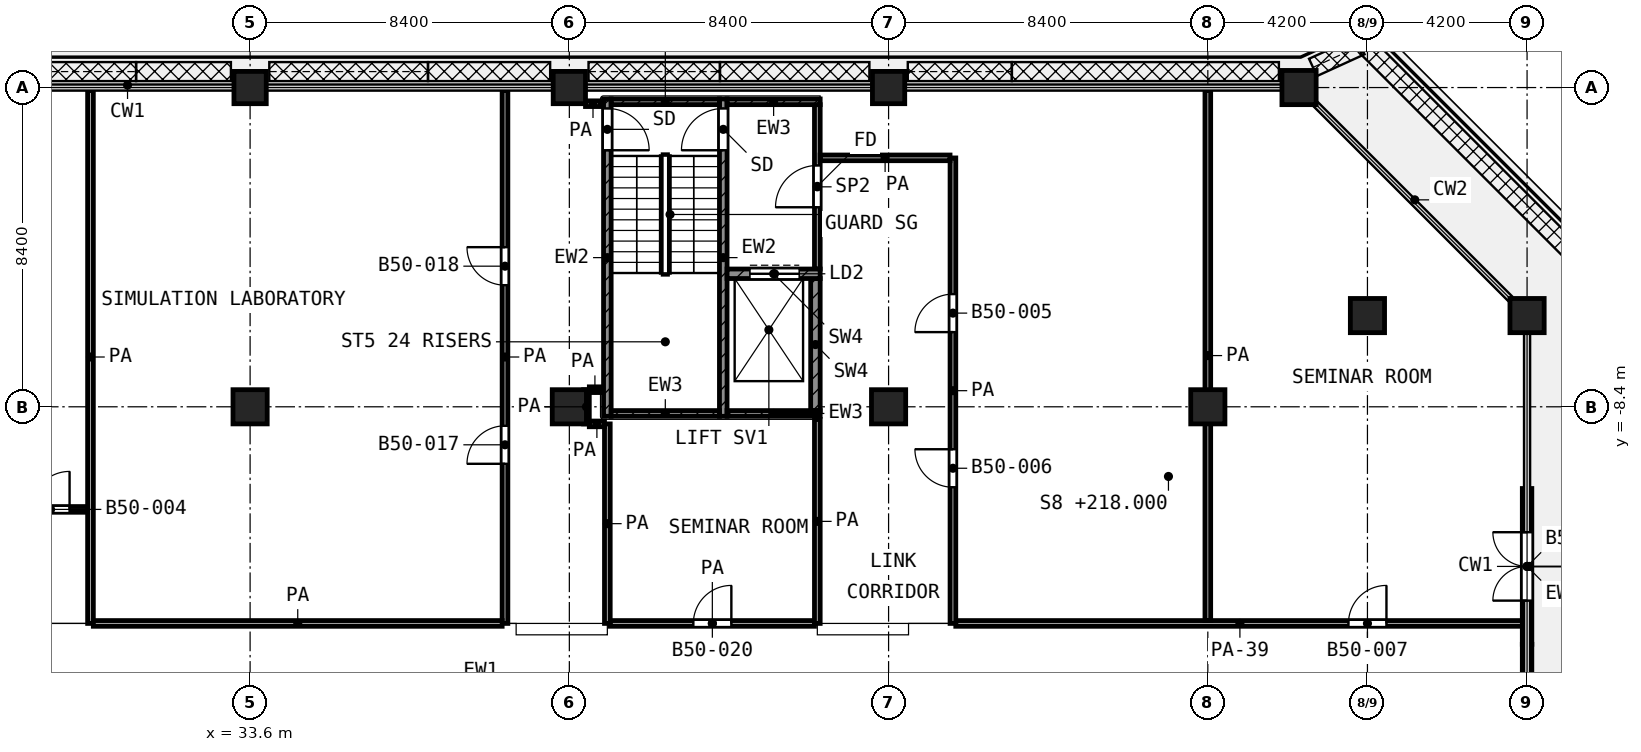
"""IFC4 building model, lengths in metres.
Left out: names, types, materials, properties, quantities, classifications, styles, units other than length and angle.
Written with IfcOpenShell. Run it as: python <this file> out.ifc"""

import sys

from ifc_helpers import new_model, si_unit, direction, frame, frame_2d, origin, origin_2d, place, context, subcontext, project, spatial, rectangle, extrude, element, fill, save


model = new_model("IFC4")
c1 = context("Model", 3, precision=1e-05, world=origin(), true_north=direction((0.0, 1.0)))
c2 = subcontext(c1, "Body", "Model", "MODEL_VIEW")
j1 = project(units=[si_unit("LENGTHUNIT", "METRE"), si_unit("PLANEANGLEUNIT", "RADIAN")], contexts=[c1])
p1 = place(None, origin())
s1 = spatial("IfcSite", under=j1, at=p1, CompositionType="ELEMENT")
p2 = place(p1, origin())
s2 = spatial("IfcBuilding", under=s1, at=p2, CompositionType="ELEMENT")
p3 = place(p2, frame((0.0, 0.0, 218.0)))
s3 = spatial("IfcBuildingStorey", under=s2, at=p3, CompositionType="ELEMENT", Elevation=218.0)
for number, where, z_axis, x_axis in (
    (1, (33.6, 0.0, 0.0), (0.0, 0.0, 1.0), (1.0, 0.0, 0.0)),
    (2, (42.0, 0.0, 0.0), (0.0, 0.0, 1.0), (1.0, 0.0, 0.0)),
    (3, (50.4, 0.0, 0.0), (0.0, 0.0, 1.0), (1.0, 0.0, 0.0)),
):
    element("IfcColumn", number, at=place(p3, frame(where, z_axis=z_axis, x_axis=x_axis)), inside=s3, PredefinedType="COLUMN", context=c2, shape_type="SweptSolid", body=[
        extrude(rectangle(XDim=0.85, YDim=0.85, at=origin_2d()), origin(), (0.0, 0.0, 1.0), 4.2),
    ])
for number, where, z_axis, x_axis in (
    (4, (61.2, 0.0, 0.0), (0.0, 0.0, 1.0), (1.0, 0.0, 0.0)),
    (5, (63.0, -6.0, 0.0), (0.0, 0.0, 1.0), (1.0, 0.0, 0.0)),
    (6, (67.2, -6.0, 0.0), (0.0, 0.0, 1.0), (1.0, 0.0, 0.0)),
    (7, (33.6, -8.4, 0.0), (0.0, 0.0, 1.0), (1.0, 0.0, 0.0)),
    (8, (42.0, -8.4, 0.0), (0.0, 0.0, 1.0), (1.0, 0.0, 0.0)),
    (9, (50.4, -8.4, 0.0), (0.0, 0.0, 1.0), (1.0, 0.0, 0.0)),
    (10, (58.8, -8.4, 0.0), (0.0, 0.0, 1.0), (1.0, 0.0, 0.0)),
):
    element("IfcColumn", number, at=place(p3, frame(where, z_axis=z_axis, x_axis=x_axis)), inside=s3, PredefinedType="COLUMN", context=c2, shape_type="SweptSolid", body=[
        extrude(rectangle(XDim=0.9, YDim=0.9, at=origin_2d()), origin(), (0.0, 0.0, 1.0), 4.2),
    ])
p4 = place(p3, frame((67.2, -18.75, 0.0), z_axis=(0.0, 0.0, 1.0), x_axis=(0.0, 1.0, 0.0)))
e11 = element("IfcWall", 11, at=p4, inside=s3, PredefinedType="SOLIDWALL", context=c2, shape_type="SweptSolid", body=[
    extrude(rectangle(XDim=4.1, YDim=0.25, at=frame_2d((2.05, 0.0))), origin(), (0.0, 0.0, 1.0), 2.58),
])
p5 = place(p4, frame((2.25, 0.0, 0.0)))
e12 = element("IfcOpeningElement", 12, at=p5, cuts=e11, PredefinedType="OPENING", context=c2, shape_type="SweptSolid", body=[
    extrude(rectangle(XDim=1.0, YDim=2.1, at=frame_2d((0.5, 1.05))), frame((0.0, 0.135, 0.0), z_axis=(0.0, -1.0, 0.0), x_axis=(1.0, 0.0, 0.0)), (0.0, 0.0, 1.0), 0.27),
])
p6 = place(p3, frame((67.2, -14.65, 0.0), z_axis=(0.0, 0.0, 1.0), x_axis=(0.0, 1.0, 0.0)))
e13 = element("IfcWall", 13, at=p6, inside=s3, PredefinedType="SOLIDWALL", context=c2, shape_type="SweptSolid", body=[
    extrude(rectangle(XDim=4.1, YDim=0.25, at=frame_2d((2.05, 0.0))), origin(), (0.0, 0.0, 1.0), 2.58),
])
p7 = place(p6, frame((1.15, 0.0, 0.0)))
e14 = element("IfcOpeningElement", 14, at=p7, cuts=e13, PredefinedType="OPENING", context=c2, shape_type="SweptSolid", body=[
    extrude(rectangle(XDim=1.8, YDim=2.1, at=frame_2d((0.9, 1.05))), frame((0.0, 0.135, 0.0), z_axis=(0.0, -1.0, 0.0), x_axis=(1.0, 0.0, 0.0)), (0.0, 0.0, 1.0), 0.27),
])
p8 = place(p3, frame((43.0, -8.65, 0.0), z_axis=(0.0, 0.0, 1.0), x_axis=(0.0, 1.0, 0.0)))
e15 = element("IfcWall", 15, at=p8, inside=s3, PredefinedType="SHEAR", context=c2, shape_type="SweptSolid", body=[
    extrude(rectangle(XDim=8.35, YDim=0.2, at=frame_2d((4.175, 0.0))), origin(), (0.0, 0.0, 1.0), 3.6),
])
p9 = place(p8, frame((7.0, 0.0, 0.0)))
e16 = element("IfcOpeningElement", 16, at=p9, cuts=e15, PredefinedType="OPENING", context=c2, shape_type="SweptSolid", body=[
    extrude(rectangle(XDim=1.1, YDim=2.1, at=frame_2d((0.55, 1.05))), frame((0.0, 0.11, 0.0), z_axis=(0.0, -1.0, 0.0), x_axis=(1.0, 0.0, 0.0)), (0.0, 0.0, 1.0), 0.22),
])
p10 = place(p3, frame((46.05, -8.65, 0.0), z_axis=(0.0, 0.0, 1.0), x_axis=(0.0, 1.0, 0.0)))
e17 = element("IfcWall", 17, at=p10, inside=s3, PredefinedType="SHEAR", context=c2, shape_type="SweptSolid", body=[
    extrude(rectangle(XDim=8.35, YDim=0.2, at=frame_2d((4.175, 0.0))), origin(), (0.0, 0.0, 1.0), 3.6),
])
p11 = place(p10, frame((7.0, 0.0, 0.0)))
e18 = element("IfcOpeningElement", 18, at=p11, cuts=e17, PredefinedType="OPENING", context=c2, shape_type="SweptSolid", body=[
    extrude(rectangle(XDim=1.1, YDim=2.1, at=frame_2d((0.55, 1.05))), frame((0.0, 0.11, 0.0), z_axis=(0.0, -1.0, 0.0), x_axis=(1.0, 0.0, 0.0)), (0.0, 0.0, 1.0), 0.22),
])
p12 = place(p3, frame((43.1, -0.375, 0.0), z_axis=(0.0, 0.0, 1.0), x_axis=(1.0, 0.0, 0.0)))
e19 = element("IfcWall", 19, at=p12, inside=s3, PredefinedType="SHEAR", context=c2, shape_type="SweptSolid", body=[
    extrude(rectangle(XDim=2.85, YDim=0.15, at=frame_2d((1.425, 0.0))), origin(), (0.0, 0.0, 1.0), 3.6),
])
p13 = place(p3, frame((46.15, -0.375, 0.0), z_axis=(0.0, 0.0, 1.0), x_axis=(1.0, 0.0, 0.0)))
e20 = element("IfcWall", 20, at=p13, inside=s3, PredefinedType="SHEAR", context=c2, shape_type="SweptSolid", body=[
    extrude(rectangle(XDim=2.45, YDim=0.15, at=frame_2d((1.225, 0.0))), origin(), (0.0, 0.0, 1.0), 3.6),
])
p14 = place(p3, frame((43.1, -8.575, 0.0), z_axis=(0.0, 0.0, 1.0), x_axis=(1.0, 0.0, 0.0)))
e21 = element("IfcWall", 21, at=p14, inside=s3, PredefinedType="SHEAR", context=c2, shape_type="SweptSolid", body=[
    extrude(rectangle(XDim=2.85, YDim=0.15, at=frame_2d((1.425, 0.0))), origin(), (0.0, 0.0, 1.0), 3.6),
])
p15 = place(p3, frame((46.15, -8.575, 0.0), z_axis=(0.0, 0.0, 1.0), x_axis=(1.0, 0.0, 0.0)))
e22 = element("IfcWall", 22, at=p15, inside=s3, PredefinedType="SHEAR", context=c2, shape_type="SweptSolid", body=[
    extrude(rectangle(XDim=2.45, YDim=0.15, at=frame_2d((1.225, 0.0))), origin(), (0.0, 0.0, 1.0), 3.6),
])
p16 = place(p3, frame((46.15, -4.9, 0.0), z_axis=(0.0, 0.0, 1.0), x_axis=(1.0, 0.0, 0.0)))
e23 = element("IfcWall", 23, at=p16, inside=s3, PredefinedType="SHEAR", context=c2, shape_type="SweptSolid", body=[
    extrude(rectangle(XDim=2.45, YDim=0.25, at=frame_2d((1.225, 0.0))), origin(), (0.0, 0.0, 1.0), 3.6),
])
p17 = place(p16, frame((0.6, 0.0, 0.0)))
e24 = element("IfcOpeningElement", 24, at=p17, cuts=e23, PredefinedType="OPENING", context=c2, shape_type="SweptSolid", body=[
    extrude(rectangle(XDim=1.3, YDim=2.1, at=frame_2d((0.65, 1.05))), frame((0.0, 0.135, 0.0), z_axis=(0.0, -1.0, 0.0), x_axis=(1.0, 0.0, 0.0)), (0.0, 0.0, 1.0), 0.27),
])
p18 = place(p3, frame((48.475, -8.5, 0.0), z_axis=(0.0, 0.0, 1.0), x_axis=(0.0, 1.0, 0.0)))
e25 = element("IfcWall", 25, at=p18, inside=s3, PredefinedType="SHEAR", context=c2, shape_type="SweptSolid", body=[
    extrude(rectangle(XDim=3.475, YDim=0.25, at=frame_2d((1.738, 0.0))), origin(), (0.0, 0.0, 1.0), 3.6),
])
p19 = place(p3, frame((48.525, -4.775, 0.0), z_axis=(0.0, 0.0, 1.0), x_axis=(0.0, 1.0, 0.0)))
e26 = element("IfcWall", 26, at=p19, inside=s3, PredefinedType="PARTITIONING", context=c2, shape_type="SweptSolid", body=[
    extrude(rectangle(XDim=4.325, YDim=0.15, at=frame_2d((2.163, 0.0))), origin(), (0.0, 0.0, 1.0), 3.6),
])
p20 = place(p19, frame((1.625, 0.0, 0.0)))
e27 = element("IfcOpeningElement", 27, at=p20, cuts=e26, PredefinedType="OPENING", context=c2, shape_type="SweptSolid", body=[
    extrude(rectangle(XDim=1.1, YDim=2.1, at=frame_2d((0.55, 1.05))), frame((0.0, 0.085, 0.0), z_axis=(0.0, -1.0, 0.0), x_axis=(1.0, 0.0, 0.0)), (0.0, 0.0, 1.0), 0.17),
])
p21 = place(p3, frame((29.475, -14.1, 0.0), z_axis=(0.0, 0.0, 1.0), x_axis=(1.0, 0.0, 0.0)))
e28 = element("IfcWall", 28, at=p21, inside=s3, PredefinedType="PARTITIONING", context=c2, shape_type="SweptSolid", body=[
    extrude(rectangle(XDim=10.757, YDim=0.15, at=frame_2d((5.378, 0.0))), origin(), (0.0, 0.0, 1.0), 3.6),
])
p22 = place(p3, frame((43.075, -14.1, 0.0), z_axis=(0.0, 0.0, 1.0), x_axis=(1.0, 0.0, 0.0)))
e29 = element("IfcWall", 29, at=p22, inside=s3, PredefinedType="PARTITIONING", context=c2, shape_type="SweptSolid", body=[
    extrude(rectangle(XDim=5.375, YDim=0.15, at=frame_2d((2.688, 0.0))), origin(), (0.0, 0.0, 1.0), 3.6),
])
p23 = place(p22, frame((2.188, 0.0, 0.0)))
e30 = element("IfcOpeningElement", 30, at=p23, cuts=e29, PredefinedType="OPENING", context=c2, shape_type="SweptSolid", body=[
    extrude(rectangle(XDim=1.0, YDim=2.1, at=frame_2d((0.5, 1.05))), frame((0.0, 0.085, 0.0), z_axis=(0.0, -1.0, 0.0), x_axis=(1.0, 0.0, 0.0)), (0.0, 0.0, 1.0), 0.17),
])
p24 = place(p3, frame((52.168, -14.1, 0.0), z_axis=(0.0, 0.0, 1.0), x_axis=(1.0, 0.0, 0.0)))
e31 = element("IfcWall", 31, at=p24, inside=s3, PredefinedType="PARTITIONING", context=c2, shape_type="SweptSolid", body=[
    extrude(rectangle(XDim=14.952, YDim=0.15, at=frame_2d((7.476, 0.0))), origin(), (0.0, 0.0, 1.0), 2.7),
])
p25 = place(p24, frame((10.332, 0.0, 0.0)))
e32 = element("IfcOpeningElement", 32, at=p25, cuts=e31, PredefinedType="OPENING", context=c2, shape_type="SweptSolid", body=[
    extrude(rectangle(XDim=1.0, YDim=2.1, at=frame_2d((0.5, 1.05))), frame((0.0, 0.085, 0.0), z_axis=(0.0, -1.0, 0.0), x_axis=(1.0, 0.0, 0.0)), (0.0, 0.0, 1.0), 0.17),
])
p26 = place(p3, frame((24.8, -11.1, 0.0), z_axis=(0.0, 0.0, 1.0), x_axis=(1.0, 0.0, 0.0)))
e33 = element("IfcWall", 33, at=p26, inside=s3, PredefinedType="PARTITIONING", context=c2, shape_type="SweptSolid", body=[
    extrude(rectangle(XDim=4.525, YDim=0.15, at=frame_2d((2.262, 0.0))), origin(), (0.0, 0.0, 1.0), 3.6),
])
p27 = place(p26, frame((1.0, 0.0, 0.0)))
e34 = element("IfcOpeningElement", 34, at=p27, cuts=e33, PredefinedType="OPENING", context=c2, shape_type="SweptSolid", body=[
    extrude(rectangle(XDim=0.9, YDim=2.1, at=frame_2d((0.45, 1.05))), frame((0.0, 0.085, 0.0), z_axis=(0.0, -1.0, 0.0), x_axis=(1.0, 0.0, 0.0)), (0.0, 0.0, 1.0), 0.17),
])
p28 = place(p26, frame((3.05, 0.0, 0.0)))
e35 = element("IfcOpeningElement", 35, at=p28, cuts=e33, PredefinedType="OPENING", context=c2, shape_type="SweptSolid", body=[
    extrude(rectangle(XDim=1.0, YDim=2.1, at=frame_2d((0.5, 1.05))), frame((0.0, 0.085, 0.0), z_axis=(0.0, -1.0, 0.0), x_axis=(1.0, 0.0, 0.0)), (0.0, 0.0, 1.0), 0.17),
])
p29 = place(p3, frame((42.525, -8.85, 0.0), z_axis=(0.0, 0.0, 1.0), x_axis=(1.0, 0.0, 0.0)))
e36 = element("IfcWall", 36, at=p29, inside=s3, PredefinedType="PARTITIONING", context=c2, shape_type="SweptSolid", body=[
    extrude(rectangle(XDim=0.4, YDim=0.15, at=frame_2d((0.2, 0.0))), origin(), (0.0, 0.0, 1.0), 3.6),
])
p30 = place(p3, frame((42.526, -7.95, 0.0), z_axis=(0.0, 0.0, 1.0), x_axis=(1.0, 0.0, 0.0)))
e37 = element("IfcWall", 37, at=p30, inside=s3, PredefinedType="PARTITIONING", context=c2, shape_type="SweptSolid", body=[
    extrude(rectangle(XDim=0.294, YDim=0.15, at=frame_2d((0.147, 0.0))), origin(), (0.0, 0.0, 1.0), 3.6),
])
p31 = place(p3, frame((48.6, -1.85, 0.0), z_axis=(0.0, 0.0, 1.0), x_axis=(1.0, 0.0, 0.0)))
e38 = element("IfcWall", 38, at=p31, inside=s3, PredefinedType="PARTITIONING", context=c2, shape_type="SweptSolid", body=[
    extrude(rectangle(XDim=3.417, YDim=0.15, at=frame_2d((1.708, 0.0))), origin(), (0.0, 0.0, 1.0), 3.6),
])
p32 = place(p3, frame((42.425, -0.425, 0.0), z_axis=(0.0, 0.0, 1.0), x_axis=(1.0, 0.0, 0.0)))
e39 = element("IfcWall", 39, at=p32, inside=s3, PredefinedType="PARTITIONING", context=c2, shape_type="SweptSolid", body=[
    extrude(rectangle(XDim=0.395, YDim=0.15, at=frame_2d((0.198, 0.0))), origin(), (0.0, 0.0, 1.0), 3.6),
])
p33 = place(p3, frame((29.4, -14.1, 0.0), z_axis=(0.0, 0.0, 1.0), x_axis=(0.0, 1.0, 0.0)))
e40 = element("IfcWall", 40, at=p33, inside=s3, PredefinedType="PARTITIONING", context=c2, shape_type="SweptSolid", body=[
    extrude(rectangle(XDim=14.02, YDim=0.15, at=frame_2d((7.01, 0.0))), origin(), (0.0, 0.0, 1.0), 3.6),
])
p34 = place(p3, frame((40.307, -14.1, 0.0), z_axis=(0.0, 0.0, 1.0), x_axis=(0.0, 1.0, 0.0)))
e41 = element("IfcWall", 41, at=p34, inside=s3, PredefinedType="PARTITIONING", context=c2, shape_type="SweptSolid", body=[
    extrude(rectangle(XDim=14.02, YDim=0.15, at=frame_2d((7.01, 0.0))), origin(), (0.0, 0.0, 1.0), 3.6),
])
p35 = place(p34, frame((4.2, 0.0, 0.0)))
e42 = element("IfcOpeningElement", 42, at=p35, cuts=e41, PredefinedType="OPENING", context=c2, shape_type="SweptSolid", body=[
    extrude(rectangle(XDim=1.0, YDim=2.1, at=frame_2d((0.5, 1.05))), frame((0.0, 0.085, 0.0), z_axis=(0.0, -1.0, 0.0), x_axis=(1.0, 0.0, 0.0)), (0.0, 0.0, 1.0), 0.17),
])
p36 = place(p34, frame((8.9, 0.0, 0.0)))
e43 = element("IfcOpeningElement", 43, at=p36, cuts=e41, PredefinedType="OPENING", context=c2, shape_type="SweptSolid", body=[
    extrude(rectangle(XDim=1.0, YDim=2.1, at=frame_2d((0.5, 1.05))), frame((0.0, 0.085, 0.0), z_axis=(0.0, -1.0, 0.0), x_axis=(1.0, 0.0, 0.0)), (0.0, 0.0, 1.0), 0.17),
])
p37 = place(p3, frame((42.45, -8.85, 0.0), z_axis=(0.0, 0.0, 1.0), x_axis=(0.0, 1.0, 0.0)))
e44 = element("IfcWall", 44, at=p37, inside=s3, PredefinedType="PARTITIONING", context=c2, shape_type="SweptSolid", body=[
    extrude(rectangle(XDim=0.899, YDim=0.15, at=frame_2d((0.45, 0.0))), origin(), (0.0, 0.0, 1.0), 3.6),
])
p38 = place(p3, frame((43.0, -14.1, 0.0), z_axis=(0.0, 0.0, 1.0), x_axis=(0.0, 1.0, 0.0)))
e45 = element("IfcWall", 45, at=p38, inside=s3, PredefinedType="PARTITIONING", context=c2, shape_type="SweptSolid", body=[
    extrude(rectangle(XDim=5.25, YDim=0.15, at=frame_2d((2.625, 0.0))), origin(), (0.0, 0.0, 1.0), 3.6),
])
p39 = place(p3, frame((48.525, -14.1, 0.0), z_axis=(0.0, 0.0, 1.0), x_axis=(0.0, 1.0, 0.0)))
e46 = element("IfcWall", 46, at=p39, inside=s3, PredefinedType="PARTITIONING", context=c2, shape_type="SweptSolid", body=[
    extrude(rectangle(XDim=5.37, YDim=0.15, at=frame_2d((2.685, 0.0))), origin(), (0.0, 0.0, 1.0), 3.6),
])
p40 = place(p3, frame((52.093, -14.1, 0.0), z_axis=(0.0, 0.0, 1.0), x_axis=(0.0, 1.0, 0.0)))
e47 = element("IfcWall", 47, at=p40, inside=s3, PredefinedType="PARTITIONING", context=c2, shape_type="SweptSolid", body=[
    extrude(rectangle(XDim=12.248, YDim=0.15, at=frame_2d((6.124, 0.0))), origin(), (0.0, 0.0, 1.0), 3.6),
])
p41 = place(p40, frame((7.665, 0.0, 0.0)))
e48 = element("IfcOpeningElement", 48, at=p41, cuts=e47, PredefinedType="OPENING", context=c2, shape_type="SweptSolid", body=[
    extrude(rectangle(XDim=1.0, YDim=2.1, at=frame_2d((0.5, 1.05))), frame((0.0, 0.085, 0.0), z_axis=(0.0, -1.0, 0.0), x_axis=(1.0, 0.0, 0.0)), (0.0, 0.0, 1.0), 0.17),
])
p42 = place(p40, frame((3.583, 0.0, 0.0)))
e49 = element("IfcOpeningElement", 49, at=p42, cuts=e47, PredefinedType="OPENING", context=c2, shape_type="SweptSolid", body=[
    extrude(rectangle(XDim=1.0, YDim=2.1, at=frame_2d((0.5, 1.05))), frame((0.0, 0.085, 0.0), z_axis=(0.0, -1.0, 0.0), x_axis=(1.0, 0.0, 0.0)), (0.0, 0.0, 1.0), 0.17),
])
p43 = place(p3, frame((58.8, -14.025, 0.0), z_axis=(0.0, 0.0, 1.0), x_axis=(0.0, 1.0, 0.0)))
e50 = element("IfcWall", 50, at=p43, inside=s3, PredefinedType="PARTITIONING", context=c2, shape_type="SweptSolid", body=[
    extrude(rectangle(XDim=13.945, YDim=0.15, at=frame_2d((6.972, 0.0))), origin(), (0.0, 0.0, 1.0), 3.6),
])
p44 = place(p7, origin())
e51 = element("IfcDoor", 51, at=p44, inside=s3, OperationType="DOUBLE_DOOR_SINGLE_SWING", PredefinedType="DOOR", context=c2, shape_type="SweptSolid", body=[
    extrude(rectangle(XDim=1.8, YDim=2.1, at=frame_2d((0.9, 1.05))), frame((0.0, 0.025, 0.0), z_axis=(0.0, -1.0, 0.0), x_axis=(1.0, 0.0, 0.0)), (0.0, 0.0, 1.0), 0.05),
])
fill(e14, e51)
p45 = place(p9, frame((1.1, 0.0, 0.0), z_axis=(0.0, 0.0, 1.0), x_axis=(-1.0, 0.0, 0.0)))
e52 = element("IfcDoor", 52, at=p45, inside=s3, OperationType="SINGLE_SWING_LEFT", PredefinedType="DOOR", context=c2, shape_type="SweptSolid", body=[
    extrude(rectangle(XDim=1.1, YDim=2.1, at=frame_2d((0.55, 1.05))), frame((0.0, 0.025, 0.0), z_axis=(0.0, -1.0, 0.0), x_axis=(1.0, 0.0, 0.0)), (0.0, 0.0, 1.0), 0.05),
])
fill(e16, e52)
p46 = place(p11, origin())
e53 = element("IfcDoor", 53, at=p46, inside=s3, OperationType="SINGLE_SWING_LEFT", PredefinedType="DOOR", context=c2, shape_type="SweptSolid", body=[
    extrude(rectangle(XDim=1.1, YDim=2.1, at=frame_2d((0.55, 1.05))), frame((0.0, 0.025, 0.0), z_axis=(0.0, -1.0, 0.0), x_axis=(1.0, 0.0, 0.0)), (0.0, 0.0, 1.0), 0.05),
])
fill(e18, e53)
p47 = place(p17, origin())
e54 = element("IfcDoor", 54, at=p47, inside=s3, OperationType="DOUBLE_DOOR_SLIDING", PredefinedType="DOOR", context=c2, shape_type="SweptSolid", body=[
    extrude(rectangle(XDim=1.3, YDim=2.1, at=frame_2d((0.65, 1.05))), frame((0.0, 0.025, 0.0), z_axis=(0.0, -1.0, 0.0), x_axis=(1.0, 0.0, 0.0)), (0.0, 0.0, 1.0), 0.05),
])
fill(e24, e54)
p48 = place(p20, origin())
e55 = element("IfcDoor", 55, at=p48, inside=s3, OperationType="SINGLE_SWING_LEFT", PredefinedType="DOOR", context=c2, shape_type="SweptSolid", body=[
    extrude(rectangle(XDim=1.1, YDim=2.1, at=frame_2d((0.55, 1.05))), frame((0.0, 0.025, 0.0), z_axis=(0.0, -1.0, 0.0), x_axis=(1.0, 0.0, 0.0)), (0.0, 0.0, 1.0), 0.05),
])
fill(e27, e55)
p49 = place(p41, origin())
e56 = element("IfcDoor", 56, at=p49, inside=s3, OperationType="SINGLE_SWING_LEFT", PredefinedType="DOOR", context=c2, shape_type="SweptSolid", body=[
    extrude(rectangle(XDim=1.0, YDim=2.1, at=frame_2d((0.5, 1.05))), frame((0.0, 0.025, 0.0), z_axis=(0.0, -1.0, 0.0), x_axis=(1.0, 0.0, 0.0)), (0.0, 0.0, 1.0), 0.05),
])
fill(e48, e56)
p50 = place(p42, origin())
e57 = element("IfcDoor", 57, at=p50, inside=s3, OperationType="SINGLE_SWING_RIGHT", PredefinedType="DOOR", context=c2, shape_type="SweptSolid", body=[
    extrude(rectangle(XDim=1.0, YDim=2.1, at=frame_2d((0.5, 1.05))), frame((0.0, 0.025, 0.0), z_axis=(0.0, -1.0, 0.0), x_axis=(1.0, 0.0, 0.0)), (0.0, 0.0, 1.0), 0.05),
])
fill(e49, e57)
p51 = place(p25, origin())
e58 = element("IfcDoor", 58, at=p51, inside=s3, OperationType="SINGLE_SWING_RIGHT", PredefinedType="DOOR", context=c2, shape_type="SweptSolid", body=[
    extrude(rectangle(XDim=1.0, YDim=2.1, at=frame_2d((0.5, 1.05))), frame((0.0, 0.025, 0.0), z_axis=(0.0, -1.0, 0.0), x_axis=(1.0, 0.0, 0.0)), (0.0, 0.0, 1.0), 0.05),
])
fill(e32, e58)
p52 = place(p28, origin())
e59 = element("IfcDoor", 59, at=p52, inside=s3, OperationType="SINGLE_SWING_RIGHT", PredefinedType="DOOR", context=c2, shape_type="SweptSolid", body=[
    extrude(rectangle(XDim=1.0, YDim=2.1, at=frame_2d((0.5, 1.05))), frame((0.0, 0.025, 0.0), z_axis=(0.0, -1.0, 0.0), x_axis=(1.0, 0.0, 0.0)), (0.0, 0.0, 1.0), 0.05),
])
fill(e35, e59)
p53 = place(p35, origin())
e60 = element("IfcDoor", 60, at=p53, inside=s3, OperationType="SINGLE_SWING_LEFT", PredefinedType="DOOR", context=c2, shape_type="SweptSolid", body=[
    extrude(rectangle(XDim=1.0, YDim=2.1, at=frame_2d((0.5, 1.05))), frame((0.0, 0.025, 0.0), z_axis=(0.0, -1.0, 0.0), x_axis=(1.0, 0.0, 0.0)), (0.0, 0.0, 1.0), 0.05),
])
fill(e42, e60)
p54 = place(p36, origin())
e61 = element("IfcDoor", 61, at=p54, inside=s3, OperationType="SINGLE_SWING_RIGHT", PredefinedType="DOOR", context=c2, shape_type="SweptSolid", body=[
    extrude(rectangle(XDim=1.0, YDim=2.1, at=frame_2d((0.5, 1.05))), frame((0.0, 0.025, 0.0), z_axis=(0.0, -1.0, 0.0), x_axis=(1.0, 0.0, 0.0)), (0.0, 0.0, 1.0), 0.05),
])
fill(e43, e61)
p55 = place(p23, origin())
e62 = element("IfcDoor", 62, at=p55, inside=s3, OperationType="SINGLE_SWING_RIGHT", PredefinedType="DOOR", context=c2, shape_type="SweptSolid", body=[
    extrude(rectangle(XDim=1.0, YDim=2.1, at=frame_2d((0.5, 1.05))), frame((0.0, 0.025, 0.0), z_axis=(0.0, -1.0, 0.0), x_axis=(1.0, 0.0, 0.0)), (0.0, 0.0, 1.0), 0.05),
])
fill(e30, e62)
save(model, sys.argv[1])
